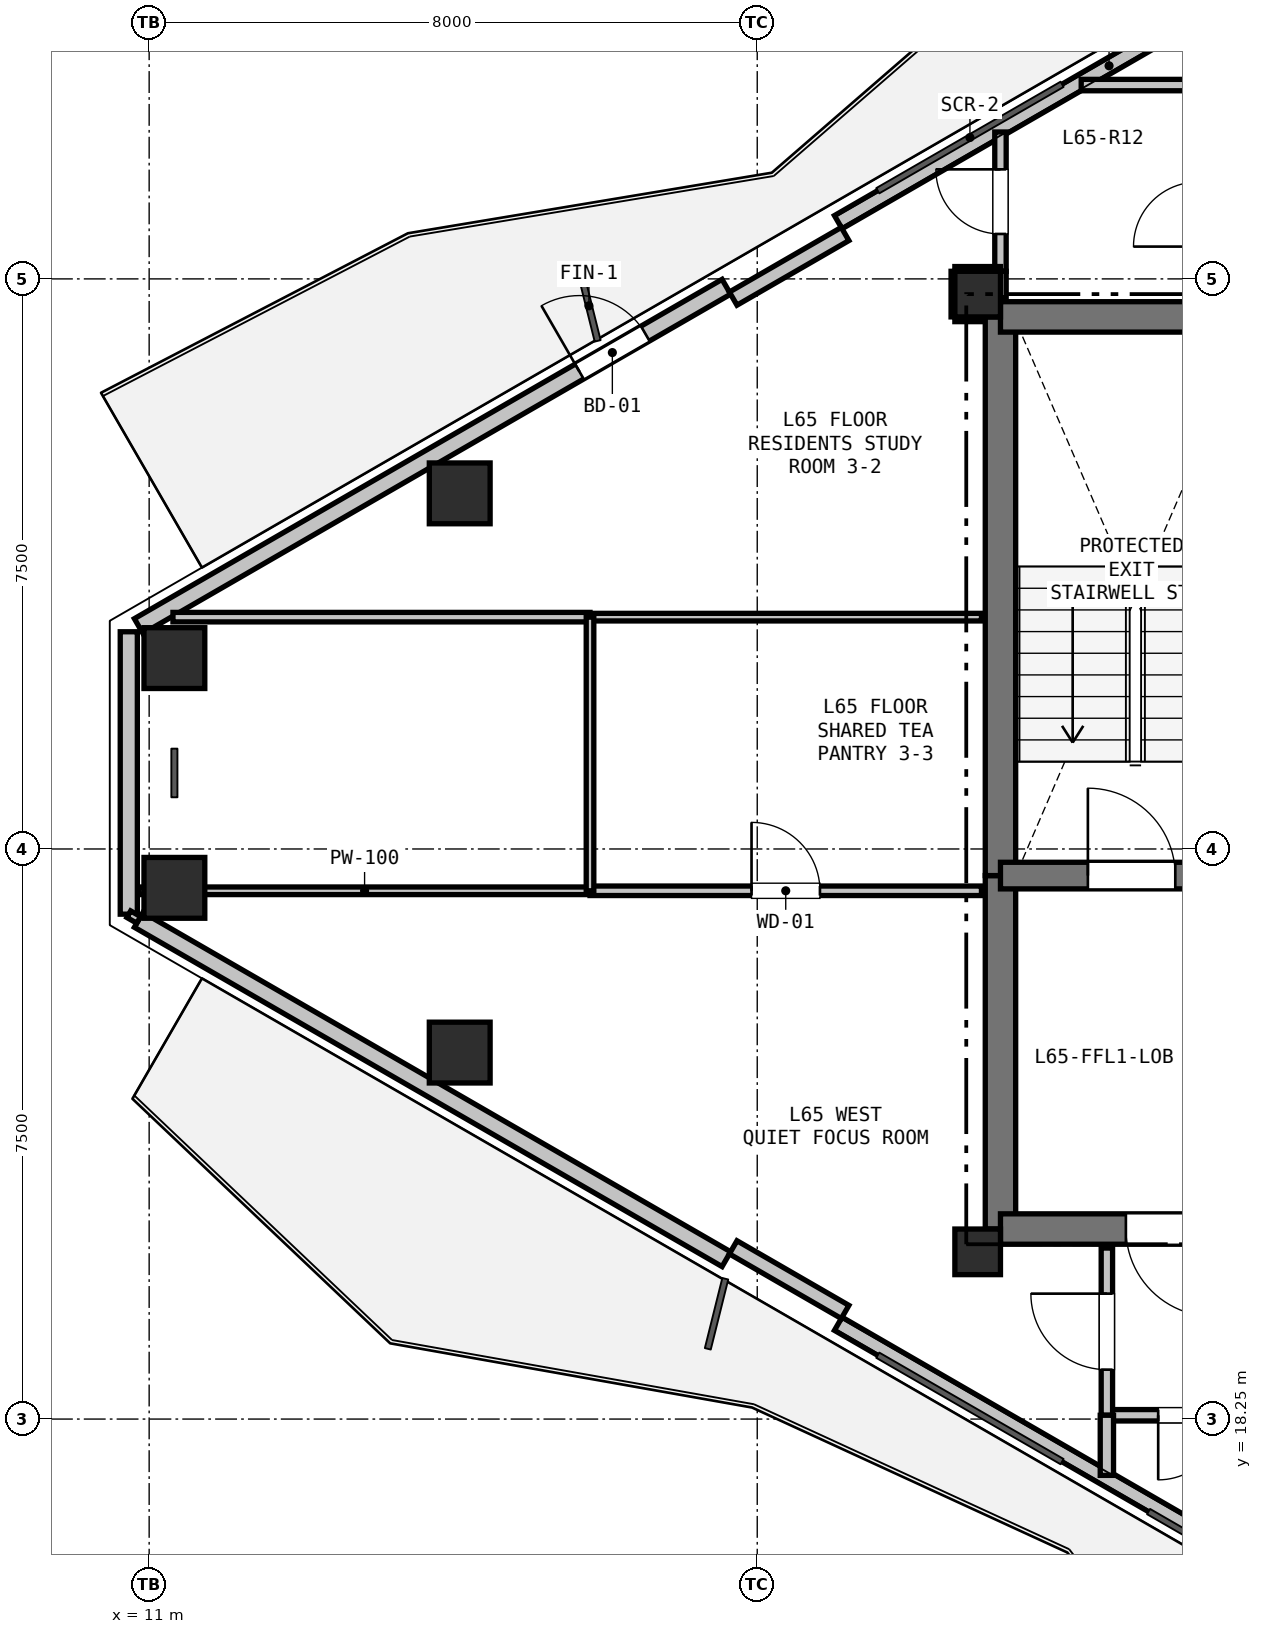
"""IFC4 building model, lengths in metres.
Left out: names, types, materials, properties, quantities, classifications, styles, units other than length and angle.
Written with IfcOpenShell. Run it as: python <this file> out.ifc"""

import sys

from ifc_helpers import new_model, si_unit, direction, frame, frame_2d, origin, origin_2d, place, context, subcontext, project, spatial, rectangle, hollow_rectangle, extrude, element, fill, save


model = new_model("IFC4")
c1 = context("Model", 3, precision=1e-05, world=origin(), true_north=direction((0.0, 1.0)))
c2 = subcontext(c1, "Body", "Model", "MODEL_VIEW")
j1 = project(units=[si_unit("LENGTHUNIT", "METRE"), si_unit("PLANEANGLEUNIT", "RADIAN")], contexts=[c1])
p1 = place(None, origin())
s1 = spatial("IfcSite", under=j1, at=p1, CompositionType="ELEMENT")
p2 = place(p1, origin())
s2 = spatial("IfcBuilding", under=s1, at=p2, CompositionType="ELEMENT")
p3 = place(p2, frame((0.0, 0.0, 233.1)))
s3 = spatial("IfcBuildingStorey", under=s2, at=p3, CompositionType="ELEMENT", Elevation=233.1)
for number, where, z_axis, x_axis in (
    (1, (21.9, 20.45, 0.0), (0.0, 0.0, 1.0), (1.0, 0.0, 0.0)),
    (2, (21.9, 33.05, 0.0), (0.0, 0.0, 1.0), (1.0, 0.0, 0.0)),
):
    element("IfcColumn", number, at=place(p3, frame(where, z_axis=z_axis, x_axis=x_axis)), inside=s3, PredefinedType="COLUMN", context=c2, shape_type="SweptSolid", body=[
        extrude(rectangle(XDim=0.6, YDim=0.6, at=origin_2d()), origin(), (0.0, 0.0, 1.0), 3.3),
    ])
for number, where, z_axis, x_axis in (
    (3, (11.332, 28.261, 0.0), (0.0, 0.0, 1.0), (1.0, 0.0, 0.0)),
    (4, (15.086, 30.428, 0.0), (0.0, 0.0, 1.0), (1.0, 0.0, 0.0)),
    (5, (15.086, 23.072, 0.0), (0.0, 0.0, 1.0), (1.0, 0.0, 0.0)),
    (6, (11.332, 25.239, 0.0), (0.0, 0.0, 1.0), (1.0, 0.0, 0.0)),
):
    element("IfcColumn", number, at=place(p3, frame(where, z_axis=z_axis, x_axis=x_axis)), inside=s3, PredefinedType="COLUMN", context=c2, shape_type="SweptSolid", body=[
        extrude(hollow_rectangle(XDim=0.8, YDim=0.8, WallThickness=0.025, at=origin_2d()), origin(), (0.0, 0.0, 1.0), 3.3),
    ])
p4 = place(p3, frame((10.732, 24.892, 0.0), z_axis=(0.0, 0.0, 1.0), x_axis=(0.0, 1.0, 0.0)))
e7 = element("IfcWall", 7, at=p4, inside=s3, PredefinedType="SOLIDWALL", context=c2, shape_type="SweptSolid", body=[
    extrude(rectangle(XDim=3.715, YDim=0.225, at=frame_2d((1.858, 0.0))), origin(), (0.0, 0.0, 1.0), 2.7),
])
p5 = place(p3, frame((10.862, 28.683, 0.0), z_axis=(0.0, 0.0, 1.0), x_axis=(0.866026655105, 0.499997832642, 0.0)))
e8 = element("IfcWall", 8, at=p5, inside=s3, PredefinedType="SOLIDWALL", context=c2, shape_type="SweptSolid", body=[
    extrude(rectangle(XDim=8.928, YDim=0.225, at=frame_2d((4.464, 0.0))), origin(), (0.0, 0.0, 1.0), 2.7),
])
p6 = place(p5, frame((6.696, 0.0, 0.0)))
e9 = element("IfcOpeningElement", 9, at=p6, cuts=e8, PredefinedType="OPENING", context=c2, shape_type="SweptSolid", body=[
    extrude(rectangle(XDim=1.0, YDim=2.1, at=frame_2d((0.5, 1.05))), frame((0.0, 0.123, 0.0), z_axis=(0.0, -1.0, 0.0), x_axis=(1.0, 0.0, 0.0)), (0.0, 0.0, 1.0), 0.245),
])
p7 = place(p3, frame((20.066, 33.997, 0.0), z_axis=(0.0, 0.0, 1.0), x_axis=(0.866019557082, 0.500010126649, 0.0)))
e10 = element("IfcWall", 10, at=p7, inside=s3, PredefinedType="PARAPET", context=c2, shape_type="SweptSolid", body=[
    extrude(rectangle(XDim=8.228, YDim=0.2, at=frame_2d((4.114, 0.0))), origin(), (0.0, 0.0, 1.0), 0.2),
])
p8 = place(p3, frame((18.684, 32.991, 0.0), z_axis=(0.0, 0.0, 1.0), x_axis=(0.866025371046, 0.500000056704, 0.0)))
e11 = element("IfcWall", 11, at=p8, inside=s3, PredefinedType="PARAPET", context=c2, shape_type="SweptSolid", body=[
    extrude(rectangle(XDim=1.7, YDim=0.2, at=frame_2d((0.85, 0.0))), origin(), (0.0, 0.0, 1.0), 2.7),
])
p9 = place(p3, frame((27.191, 15.389, 0.0), z_axis=(0.0, 0.0, 1.0), x_axis=(-0.866019557082, 0.500010126649, 0.0)))
e12 = element("IfcWall", 12, at=p9, inside=s3, PredefinedType="PARAPET", context=c2, shape_type="SweptSolid", body=[
    extrude(rectangle(XDim=8.228, YDim=0.2, at=frame_2d((4.114, 0.0))), origin(), (0.0, 0.0, 1.0), 0.2),
])
p10 = place(p3, frame((18.594, 20.354, 0.0), z_axis=(0.0, 0.0, 1.0), x_axis=(-0.866026655105, 0.499997832642, 0.0)))
e13 = element("IfcWall", 13, at=p10, inside=s3, PredefinedType="SOLIDWALL", context=c2, shape_type="SweptSolid", body=[
    extrude(rectangle(XDim=8.928, YDim=0.225, at=frame_2d((4.464, 0.0))), origin(), (0.0, 0.0, 1.0), 2.7),
])
p11 = place(p3, frame((20.156, 19.659, 0.0), z_axis=(0.0, 0.0, 1.0), x_axis=(-0.866025371046, 0.500000056704, 0.0)))
e14 = element("IfcWall", 14, at=p11, inside=s3, PredefinedType="PARAPET", context=c2, shape_type="SweptSolid", body=[
    extrude(rectangle(XDim=1.7, YDim=0.2, at=frame_2d((0.85, 0.0))), origin(), (0.0, 0.0, 1.0), 2.7),
])
p12 = place(p3, frame((22.2, 20.75, 0.0), z_axis=(0.0, 0.0, 1.0), x_axis=(0.0, 1.0, 0.0)))
e15 = element("IfcWall", 15, at=p12, inside=s3, PredefinedType="SHEAR", context=c2, shape_type="SweptSolid", body=[
    extrude(rectangle(XDim=4.65, YDim=0.4, at=frame_2d((2.325, 0.0))), origin(), (0.0, 0.0, 1.0), 3.08),
])
p13 = place(p3, frame((22.2, 25.4, 0.0), z_axis=(0.0, 0.0, 1.0), x_axis=(0.0, 1.0, 0.0)))
e16 = element("IfcWall", 16, at=p13, inside=s3, PredefinedType="SHEAR", context=c2, shape_type="SweptSolid", body=[
    extrude(rectangle(XDim=7.35, YDim=0.4, at=frame_2d((3.675, 0.0))), origin(), (0.0, 0.0, 1.0), 3.08),
])
p14 = place(p3, frame((22.2, 32.75, 0.0), z_axis=(0.0, 0.0, 1.0), x_axis=(1.0, 0.0, 0.0)))
e17 = element("IfcWall", 17, at=p14, inside=s3, PredefinedType="SHEAR", context=c2, shape_type="SweptSolid", body=[
    extrude(rectangle(XDim=3.45, YDim=0.4, at=frame_2d((1.725, 0.0))), origin(), (0.0, 0.0, 1.0), 3.08),
])
p15 = place(p3, frame((25.65, 20.75, 0.0), z_axis=(0.0, 0.0, 1.0), x_axis=(-1.0, 0.0, 0.0)))
e18 = element("IfcWall", 18, at=p15, inside=s3, PredefinedType="SHEAR", context=c2, shape_type="SweptSolid", body=[
    extrude(rectangle(XDim=3.45, YDim=0.4, at=frame_2d((1.725, 0.0))), origin(), (0.0, 0.0, 1.0), 3.08),
])
p16 = place(p15, frame((0.65, 0.0, 0.0)))
e19 = element("IfcOpeningElement", 19, at=p16, cuts=e18, PredefinedType="OPENING", context=c2, shape_type="SweptSolid", body=[
    extrude(rectangle(XDim=1.15, YDim=2.15, at=frame_2d((0.575, 1.075))), frame((0.0, 0.21, 0.0), z_axis=(0.0, -1.0, 0.0), x_axis=(1.0, 0.0, 0.0)), (0.0, 0.0, 1.0), 0.42),
])
p17 = place(p3, frame((22.2, 25.4, 0.0), z_axis=(0.0, 0.0, 1.0), x_axis=(1.0, 0.0, 0.0)))
e20 = element("IfcWall", 20, at=p17, inside=s3, PredefinedType="SHEAR", context=c2, shape_type="SweptSolid", body=[
    extrude(rectangle(XDim=3.45, YDim=0.35, at=frame_2d((1.725, 0.0))), origin(), (0.0, 0.0, 1.0), 3.08),
])
p18 = place(p17, frame((1.15, 0.0, 0.0)))
e21 = element("IfcOpeningElement", 21, at=p18, cuts=e20, PredefinedType="OPENING", context=c2, shape_type="SweptSolid", body=[
    extrude(rectangle(XDim=1.15, YDim=2.15, at=frame_2d((0.575, 1.075))), frame((0.0, 0.185, 0.0), z_axis=(0.0, -1.0, 0.0), x_axis=(1.0, 0.0, 0.0)), (0.0, 0.0, 1.0), 0.37),
])
p19 = place(p3, frame((25.8, 18.3, 0.0), z_axis=(0.0, 0.0, 1.0), x_axis=(-1.0, 0.0, 0.0)))
e22 = element("IfcWall", 22, at=p19, inside=s3, PredefinedType="PARTITIONING", context=c2, shape_type="SweptSolid", body=[
    extrude(rectangle(XDim=2.2, YDim=0.15, at=frame_2d((1.1, 0.0))), origin(), (0.0, 0.0, 1.0), 2.365),
])
p20 = place(p19, frame((0.675, 0.0, 0.0)))
e23 = element("IfcOpeningElement", 23, at=p20, cuts=e22, PredefinedType="OPENING", context=c2, shape_type="SweptSolid", body=[
    extrude(rectangle(XDim=0.85, YDim=2.1, at=frame_2d((0.425, 1.05))), frame((0.0, 0.085, 0.0), z_axis=(0.0, -1.0, 0.0), x_axis=(1.0, 0.0, 0.0)), (0.0, 0.0, 1.0), 0.17),
])
p21 = place(p3, frame((23.6, 18.3, 0.0), z_axis=(0.0, 0.0, 1.0), x_axis=(0.0, 1.0, 0.0)))
e24 = element("IfcWall", 24, at=p21, inside=s3, PredefinedType="PARTITIONING", context=c2, shape_type="SweptSolid", body=[
    extrude(rectangle(XDim=2.2, YDim=0.15, at=frame_2d((1.1, 0.0))), origin(), (0.0, 0.0, 1.0), 2.528),
])
p22 = place(p21, frame((0.6, 0.0, 0.0)))
e25 = element("IfcOpeningElement", 25, at=p22, cuts=e24, PredefinedType="OPENING", context=c2, shape_type="SweptSolid", body=[
    extrude(rectangle(XDim=1.0, YDim=2.15, at=frame_2d((0.5, 1.075))), frame((0.0, 0.085, 0.0), z_axis=(0.0, -1.0, 0.0), x_axis=(1.0, 0.0, 0.0)), (0.0, 0.0, 1.0), 0.17),
])
p23 = place(p3, frame((23.6, 17.509, 0.0), z_axis=(0.0, 0.0, 1.0), x_axis=(0.0, 1.0, 0.0)))
e26 = element("IfcWall", 26, at=p23, inside=s3, PredefinedType="PLUMBINGWALL", context=c2, shape_type="SweptSolid", body=[
    extrude(rectangle(XDim=0.791, YDim=0.175, at=frame_2d((0.396, 0.0))), origin(), (0.0, 0.0, 1.0), 2.365),
])
p24 = place(p3, frame((10.868, 25.2, 0.0), z_axis=(0.0, 0.0, 1.0), x_axis=(1.0, 0.0, 0.0)))
e27 = element("IfcWall", 27, at=p24, inside=s3, PredefinedType="PARTITIONING", context=c2, shape_type="SweptSolid", body=[
    extrude(rectangle(XDim=5.932, YDim=0.1, at=frame_2d((2.966, 0.0))), origin(), (0.0, 0.0, 1.0), 2.528),
])
p25 = place(p3, frame((16.8, 25.2, 0.0), z_axis=(0.0, 0.0, 1.0), x_axis=(1.0, 0.0, 0.0)))
e28 = element("IfcWall", 28, at=p25, inside=s3, PredefinedType="PARTITIONING", context=c2, shape_type="SweptSolid", body=[
    extrude(rectangle(XDim=5.15, YDim=0.125, at=frame_2d((2.575, 0.0))), origin(), (0.0, 0.0, 1.0), 2.605),
])
p26 = place(p25, frame((2.125, 0.0, 0.0)))
e29 = element("IfcOpeningElement", 29, at=p26, cuts=e28, PredefinedType="OPENING", context=c2, shape_type="SweptSolid", body=[
    extrude(rectangle(XDim=0.9, YDim=2.1, at=frame_2d((0.45, 1.05))), frame((0.0, 0.073, 0.0), z_axis=(0.0, -1.0, 0.0), x_axis=(1.0, 0.0, 0.0)), (0.0, 0.0, 1.0), 0.145),
])
p27 = place(p3, frame((10.862, 24.817, 0.0), z_axis=(0.0, 0.0, 1.0), x_axis=(-0.866131372301, 0.499816412211, 0.0)))
e30 = element("IfcWall", 30, at=p27, inside=s3, PredefinedType="PARTITIONING", context=c2, shape_type="SweptSolid", body=[
    extrude(rectangle(XDim=0.15, YDim=0.1, at=frame_2d((0.075, 0.0))), origin(), (0.0, 0.0, 1.0), 3.08),
])
p28 = place(p3, frame((22.2, 33.0, 0.0), z_axis=(0.0, 0.0, 1.0), x_axis=(0.0, 1.0, 0.0)))
e31 = element("IfcWall", 31, at=p28, inside=s3, PredefinedType="PARTITIONING", context=c2, shape_type="SweptSolid", body=[
    extrude(rectangle(XDim=0.35, YDim=0.15, at=frame_2d((0.175, 0.0))), origin(), (0.0, 0.0, 1.0), 2.605),
])
p29 = place(p3, frame((22.2, 33.35, 0.0), z_axis=(0.0, 0.0, 1.0), x_axis=(0.0, 1.0, 0.0)))
e32 = element("IfcWall", 32, at=p29, inside=s3, PredefinedType="PARTITIONING", context=c2, shape_type="SweptSolid", body=[
    extrude(rectangle(XDim=1.833, YDim=0.15, at=frame_2d((0.916, 0.0))), origin(), (0.0, 0.0, 1.0), 2.365),
])
p30 = place(p29, frame((0.491, 0.0, 0.0)))
e33 = element("IfcOpeningElement", 33, at=p30, cuts=e32, PredefinedType="OPENING", context=c2, shape_type="SweptSolid", body=[
    extrude(rectangle(XDim=0.85, YDim=2.1, at=frame_2d((0.425, 1.05))), frame((0.0, 0.085, 0.0), z_axis=(0.0, -1.0, 0.0), x_axis=(1.0, 0.0, 0.0)), (0.0, 0.0, 1.0), 0.17),
])
p31 = place(p3, frame((23.262, 35.8, 0.0), z_axis=(0.0, 0.0, 1.0), x_axis=(1.0, 0.0, 0.0)))
e34 = element("IfcWall", 34, at=p31, inside=s3, PredefinedType="PARTITIONING", context=c2, shape_type="SweptSolid", body=[
    extrude(rectangle(XDim=1.538, YDim=0.15, at=frame_2d((0.769, 0.0))), origin(), (0.0, 0.0, 1.0), 2.365),
])
p32 = place(p3, frame((22.2, 33.35, 0.0), z_axis=(0.0, 0.0, 1.0), x_axis=(-1.0, 0.0, 0.0)))
e35 = element("IfcWall", 35, at=p32, inside=s3, PredefinedType="PARTITIONING", context=c2, shape_type="SweptSolid", body=[
    extrude(rectangle(XDim=0.6, YDim=0.125, at=frame_2d((0.3, 0.0))), origin(), (0.0, 0.0, 1.0), 3.08),
])
p33 = place(p3, frame((21.6, 33.35, 0.0), z_axis=(0.0, 0.0, 1.0), x_axis=(0.0, -1.0, 0.0)))
e36 = element("IfcWall", 36, at=p33, inside=s3, PredefinedType="PARTITIONING", context=c2, shape_type="SweptSolid", body=[
    extrude(rectangle(XDim=0.6, YDim=0.1, at=frame_2d((0.3, 0.0))), origin(), (0.0, 0.0, 1.0), 2.528),
])
p34 = place(p3, frame((21.6, 32.75, 0.0), z_axis=(0.0, 0.0, 1.0), x_axis=(1.0, 0.0, 0.0)))
e37 = element("IfcWall", 37, at=p34, inside=s3, PredefinedType="PARTITIONING", context=c2, shape_type="SweptSolid", body=[
    extrude(rectangle(XDim=0.35, YDim=0.125, at=frame_2d((0.175, 0.0))), origin(), (0.0, 0.0, 1.0), 2.605),
])
p35 = place(p3, frame((21.95, 28.8, 0.0), z_axis=(0.0, 0.0, 1.0), x_axis=(-1.0, 0.0, 0.0)))
e38 = element("IfcWall", 38, at=p35, inside=s3, PredefinedType="PARTITIONING", context=c2, shape_type="SweptSolid", body=[
    extrude(rectangle(XDim=5.15, YDim=0.1, at=frame_2d((2.575, 0.0))), origin(), (0.0, 0.0, 1.0), 2.605),
])
p36 = place(p3, frame((16.8, 28.8, 0.0), z_axis=(0.0, 0.0, 1.0), x_axis=(-1.0, 0.0, 0.0)))
e39 = element("IfcWall", 39, at=p36, inside=s3, PredefinedType="PARTITIONING", context=c2, shape_type="SweptSolid", body=[
    extrude(rectangle(XDim=5.487, YDim=0.125, at=frame_2d((2.743, 0.0))), origin(), (0.0, 0.0, 1.0), 2.805),
])
p37 = place(p3, frame((16.8, 25.2, 0.0), z_axis=(0.0, 0.0, 1.0), x_axis=(0.0, 1.0, 0.0)))
e40 = element("IfcWall", 40, at=p37, inside=s3, PredefinedType="PARTITIONING", context=c2, shape_type="SweptSolid", body=[
    extrude(rectangle(XDim=3.6, YDim=0.1, at=frame_2d((1.8, 0.0))), origin(), (0.0, 0.0, 1.0), 3.08),
])
p38 = place(p6, origin())
e41 = element("IfcDoor", 41, at=p38, inside=s3, OperationType="SINGLE_SWING_LEFT", PredefinedType="DOOR", context=c2, shape_type="SweptSolid", body=[
    extrude(rectangle(XDim=1.0, YDim=2.1, at=frame_2d((0.5, 1.05))), frame((0.0, 0.025, 0.0), z_axis=(0.0, -1.0, 0.0), x_axis=(1.0, 0.0, 0.0)), (0.0, 0.0, 1.0), 0.05),
])
fill(e9, e41)
p39 = place(p18, origin())
e42 = element("IfcDoor", 42, at=p39, inside=s3, OperationType="SINGLE_SWING_LEFT", PredefinedType="DOOR", context=c2, shape_type="SweptSolid", body=[
    extrude(rectangle(XDim=1.15, YDim=2.15, at=frame_2d((0.575, 1.075))), frame((0.0, 0.025, 0.0), z_axis=(0.0, -1.0, 0.0), x_axis=(1.0, 0.0, 0.0)), (0.0, 0.0, 1.0), 0.05),
])
fill(e21, e42)
p40 = place(p16, origin())
e43 = element("IfcDoor", 43, at=p40, inside=s3, OperationType="SINGLE_SWING_LEFT", PredefinedType="DOOR", context=c2, shape_type="SweptSolid", body=[
    extrude(rectangle(XDim=1.15, YDim=2.15, at=frame_2d((0.575, 1.075))), frame((0.0, 0.025, 0.0), z_axis=(0.0, -1.0, 0.0), x_axis=(1.0, 0.0, 0.0)), (0.0, 0.0, 1.0), 0.05),
])
fill(e19, e43)
p41 = place(p20, origin())
e44 = element("IfcDoor", 44, at=p41, inside=s3, OperationType="SINGLE_SWING_RIGHT", PredefinedType="DOOR", context=c2, shape_type="SweptSolid", body=[
    extrude(rectangle(XDim=0.85, YDim=2.1, at=frame_2d((0.425, 1.05))), frame((0.0, 0.025, 0.0), z_axis=(0.0, -1.0, 0.0), x_axis=(1.0, 0.0, 0.0)), (0.0, 0.0, 1.0), 0.05),
])
fill(e23, e44)
p42 = place(p22, origin())
e45 = element("IfcDoor", 45, at=p42, inside=s3, OperationType="SINGLE_SWING_RIGHT", PredefinedType="DOOR", context=c2, shape_type="SweptSolid", body=[
    extrude(rectangle(XDim=1.0, YDim=2.15, at=frame_2d((0.5, 1.075))), frame((0.0, 0.025, 0.0), z_axis=(0.0, -1.0, 0.0), x_axis=(1.0, 0.0, 0.0)), (0.0, 0.0, 1.0), 0.05),
])
fill(e25, e45)
p43 = place(p30, origin())
e46 = element("IfcDoor", 46, at=p43, inside=s3, OperationType="SINGLE_SWING_RIGHT", PredefinedType="DOOR", context=c2, shape_type="SweptSolid", body=[
    extrude(rectangle(XDim=0.85, YDim=2.1, at=frame_2d((0.425, 1.05))), frame((0.0, 0.025, 0.0), z_axis=(0.0, -1.0, 0.0), x_axis=(1.0, 0.0, 0.0)), (0.0, 0.0, 1.0), 0.05),
])
fill(e33, e46)
p44 = place(p26, origin())
e47 = element("IfcDoor", 47, at=p44, inside=s3, OperationType="SINGLE_SWING_LEFT", PredefinedType="DOOR", context=c2, shape_type="SweptSolid", body=[
    extrude(rectangle(XDim=0.9, YDim=2.1, at=frame_2d((0.45, 1.05))), frame((0.0, 0.025, 0.0), z_axis=(0.0, -1.0, 0.0), x_axis=(1.0, 0.0, 0.0)), (0.0, 0.0, 1.0), 0.05),
])
fill(e29, e47)
save(model, sys.argv[1])
